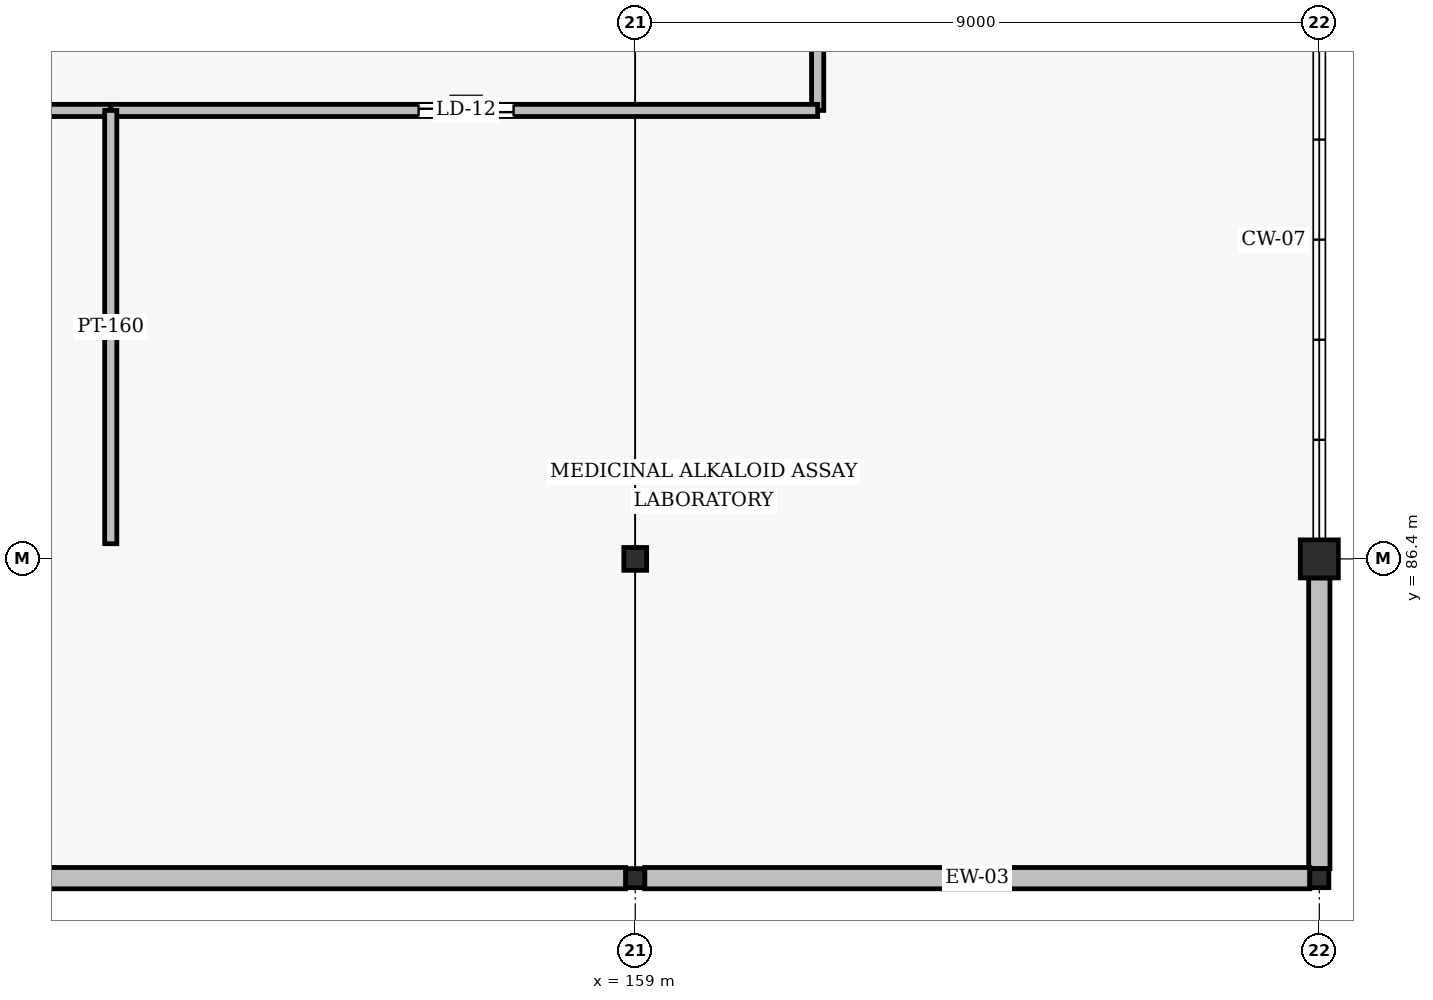
"""IFC4 building model, lengths in metres.
Left out: names, types, materials, properties, quantities, classifications, styles, units other than length and angle.
Written with IfcOpenShell. Run it as: python <this file> out.ifc"""

import sys

from ifc_helpers import new_model, si_unit, direction, frame, frame_2d, origin, origin_2d, place, context, subcontext, project, spatial, rectangle, hollow_rectangle, i_section, extrude, element, fill, save


model = new_model("IFC4")
c1 = context("Model", 3, precision=1e-05, world=origin(), true_north=direction((0.0, 1.0)))
c2 = subcontext(c1, "Body", "Model", "MODEL_VIEW")
j1 = project(units=[si_unit("LENGTHUNIT", "METRE"), si_unit("PLANEANGLEUNIT", "RADIAN")], contexts=[c1])
p1 = place(None, origin())
s1 = spatial("IfcSite", under=j1, at=p1, CompositionType="ELEMENT")
p2 = place(p1, origin())
s2 = spatial("IfcBuilding", under=s1, at=p2, CompositionType="ELEMENT")
p3 = place(p2, frame((0.0, 0.0, 39.6)))
s3 = spatial("IfcBuildingStorey", under=s2, at=p3, CompositionType="ELEMENT", Elevation=39.6)
p4 = place(p3, frame((159.0, 82.2, 0.0), z_axis=(0.0, 0.0, 1.0), x_axis=(1.0, 0.0, 0.0)))
e1 = element("IfcColumn", 1, at=p4, inside=s3, PredefinedType="COLUMN", context=c2, shape_type="SweptSolid", body=[
    extrude(i_section(OverallWidth=0.25, OverallDepth=0.25, WebThickness=0.009, FlangeThickness=0.014, FilletRadius=0.016, at=origin_2d()), origin(), (0.0, 0.0, 1.0), 3.6),
])
p5 = place(p3, frame((159.0, 86.4, 0.0), z_axis=(0.0, 0.0, 1.0), x_axis=(1.0, 0.0, 0.0)))
e2 = element("IfcColumn", 2, at=p5, inside=s3, PredefinedType="COLUMN", context=c2, shape_type="SweptSolid", body=[
    extrude(i_section(OverallWidth=0.3, OverallDepth=0.3, WebThickness=0.01, FlangeThickness=0.015, FilletRadius=0.018, at=origin_2d()), origin(), (0.0, 0.0, 1.0), 3.6),
])
p6 = place(p3, frame((168.0, 82.2, 0.0), z_axis=(0.0, 0.0, 1.0), x_axis=(1.0, 0.0, 0.0)))
e3 = element("IfcColumn", 3, at=p6, inside=s3, PredefinedType="COLUMN", context=c2, shape_type="SweptSolid", body=[
    extrude(i_section(OverallWidth=0.25, OverallDepth=0.25, WebThickness=0.009, FlangeThickness=0.014, FilletRadius=0.016, at=origin_2d()), origin(), (0.0, 0.0, 1.0), 3.6),
])
p7 = place(p3, frame((168.0, 86.4, 0.0), z_axis=(0.0, 0.0, 1.0), x_axis=(1.0, 0.0, 0.0)))
e4 = element("IfcColumn", 4, at=p7, inside=s3, PredefinedType="COLUMN", context=c2, shape_type="SweptSolid", body=[
    extrude(hollow_rectangle(XDim=0.5, YDim=0.5, WallThickness=0.02, InnerFilletRadius=0.02, OuterFilletRadius=0.04, at=origin_2d()), origin(), (0.0, 0.0, 1.0), 3.6),
])
p8 = place(p3, frame((168.0, 82.325, 0.0), z_axis=(0.0, 0.0, 1.0), x_axis=(0.0, 1.0, 0.0)))
e5 = element("IfcWall", 5, at=p8, inside=s3, PredefinedType="SOLIDWALL", context=c2, shape_type="SweptSolid", body=[
    extrude(rectangle(XDim=3.825, YDim=0.28, at=frame_2d((1.913, 0.0))), origin(), (0.0, 0.0, 1.0), 2.848),
])
for number, where, z_axis, x_axis in (
    (6, (150.125, 82.2, 0.0), (0.0, 0.0, 1.0), (1.0, 0.0, 0.0)),
    (7, (159.125, 82.2, 0.0), (0.0, 0.0, 1.0), (1.0, 0.0, 0.0)),
):
    element("IfcWall", number, at=place(p3, frame(where, z_axis=z_axis, x_axis=x_axis)), inside=s3, PredefinedType="SOLIDWALL", context=c2, shape_type="SweptSolid", body=[
        extrude(rectangle(XDim=8.75, YDim=0.28, at=frame_2d((4.375, 0.0))), origin(), (0.0, 0.0, 1.0), 2.55),
    ])
p9 = place(p3, frame((161.4, 92.3, 0.0), z_axis=(0.0, 0.0, 1.0), x_axis=(0.0, 1.0, 0.0)))
e8 = element("IfcWall", 8, at=p9, inside=s3, PredefinedType="PARTITIONING", context=c2, shape_type="SweptSolid", body=[
    extrude(rectangle(XDim=14.1, YDim=0.16, at=frame_2d((7.05, 0.0))), origin(), (0.0, 0.0, 1.0), 2.746),
])
p10 = place(p9, frame((6.5, 0.0, 0.0)))
e9 = element("IfcOpeningElement", 9, at=p10, cuts=e8, PredefinedType="OPENING", context=c2, shape_type="SweptSolid", body=[
    extrude(rectangle(XDim=1.08, YDim=2.08, at=frame_2d((0.54, 1.04))), frame((0.0, 0.09, 0.0), z_axis=(0.0, -1.0, 0.0), x_axis=(1.0, 0.0, 0.0)), (0.0, 0.0, 1.0), 0.18),
])
p11 = place(p3, frame((138.1, 92.3, 0.0), z_axis=(0.0, 0.0, 1.0), x_axis=(1.0, 0.0, 0.0)))
e10 = element("IfcWall", 10, at=p11, inside=s3, PredefinedType="PARTITIONING", context=c2, shape_type="SweptSolid", body=[
    extrude(rectangle(XDim=14.0, YDim=0.16, at=frame_2d((7.0, 0.0))), origin(), (0.0, 0.0, 1.0), 2.842),
])
p12 = place(p11, frame((6.45, 0.0, 0.0)))
e11 = element("IfcOpeningElement", 11, at=p12, cuts=e10, PredefinedType="OPENING", context=c2, shape_type="SweptSolid", body=[
    extrude(rectangle(XDim=1.14, YDim=2.12, at=frame_2d((0.57, 1.06))), frame((0.0, 0.09, 0.0), z_axis=(0.0, -1.0, 0.0), x_axis=(1.0, 0.0, 0.0)), (0.0, 0.0, 1.0), 0.18),
])
p13 = place(p3, frame((152.1, 92.3, 0.0), z_axis=(0.0, 0.0, 1.0), x_axis=(1.0, 0.0, 0.0)))
e12 = element("IfcWall", 12, at=p13, inside=s3, PredefinedType="PARTITIONING", context=c2, shape_type="SweptSolid", body=[
    extrude(rectangle(XDim=9.3, YDim=0.16, at=frame_2d((4.65, 0.0))), origin(), (0.0, 0.0, 1.0), 2.842),
])
p14 = place(p13, frame((4.05, 0.0, 0.0)))
e13 = element("IfcOpeningElement", 13, at=p14, cuts=e12, PredefinedType="OPENING", context=c2, shape_type="SweptSolid", body=[
    extrude(rectangle(XDim=1.25, YDim=2.12, at=frame_2d((0.625, 1.06))), frame((0.0, 0.09, 0.0), z_axis=(0.0, -1.0, 0.0), x_axis=(1.0, 0.0, 0.0)), (0.0, 0.0, 1.0), 0.18),
])
p15 = place(p3, frame((152.1, 86.6, 0.0), z_axis=(0.0, 0.0, 1.0), x_axis=(0.0, 1.0, 0.0)))
e14 = element("IfcWall", 14, at=p15, inside=s3, PredefinedType="PARTITIONING", context=c2, shape_type="SweptSolid", body=[
    extrude(rectangle(XDim=5.7, YDim=0.16, at=frame_2d((2.85, 0.0))), origin(), (0.0, 0.0, 1.0), 2.942),
])
p16 = place(p14, origin())
e15 = element("IfcDoor", 15, at=p16, inside=s3, OperationType="SINGLE_SWING_LEFT", PredefinedType="DOOR", context=c2, shape_type="SweptSolid", body=[
    extrude(rectangle(XDim=1.25, YDim=2.12, at=frame_2d((0.625, 1.06))), frame((0.0, 0.025, 0.0), z_axis=(0.0, -1.0, 0.0), x_axis=(1.0, 0.0, 0.0)), (0.0, 0.0, 1.0), 0.05),
])
fill(e13, e15)
save(model, sys.argv[1])
